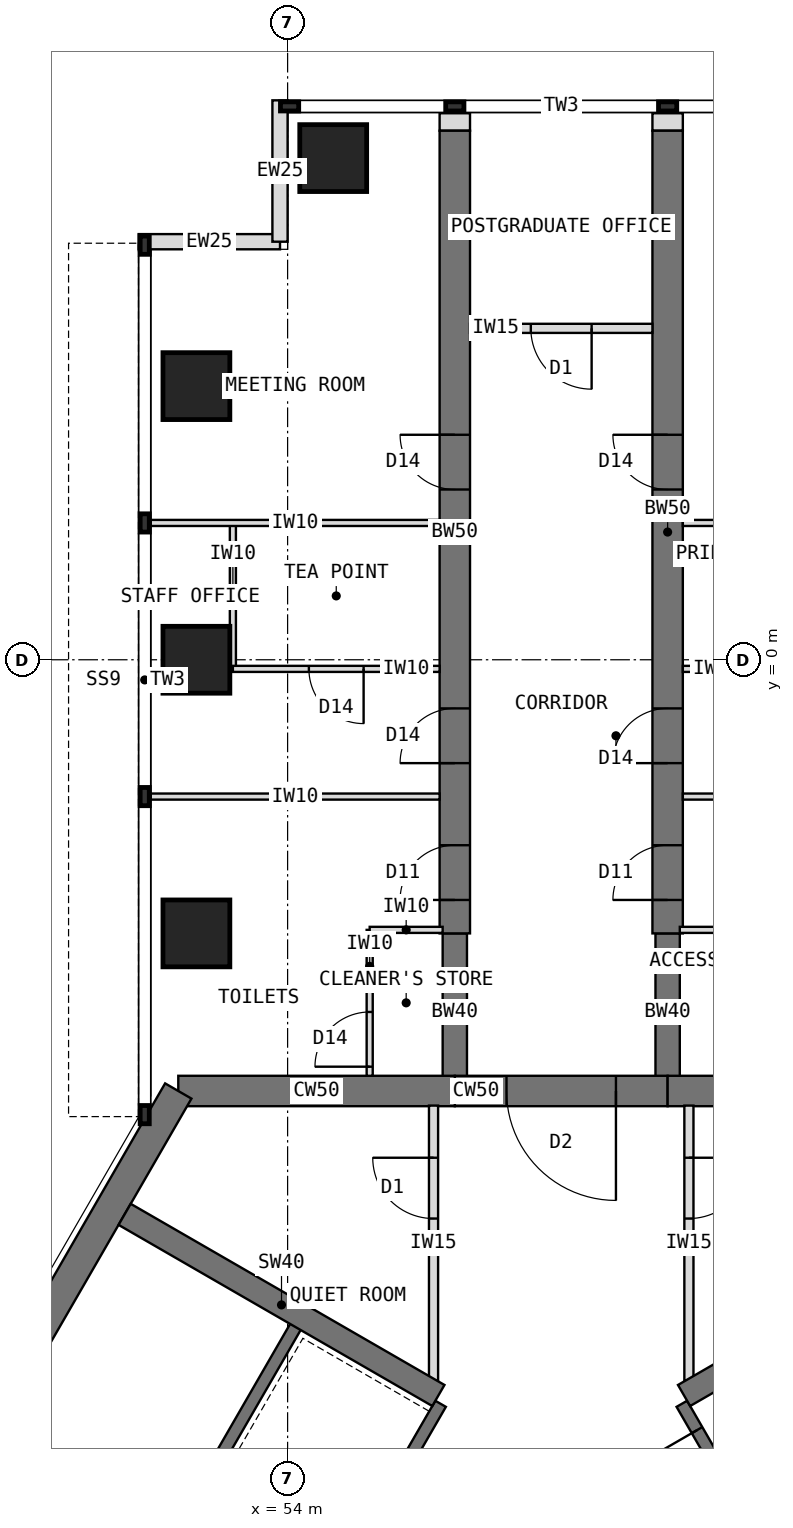
"""IFC4 building model, lengths in metres.
Left out: names, types, materials, properties, quantities, classifications, styles, units other than length and angle.
Written with IfcOpenShell. Run it as: python <this file> out.ifc"""

import sys

from ifc_helpers import new_model, si_unit, direction, frame, frame_2d, origin, origin_2d, place, context, subcontext, project, spatial, rectangle, extrude, element, fill, save


model = new_model("IFC4")
c1 = context("Model", 3, precision=1e-05, world=origin(), true_north=direction((0.0, 1.0)))
c2 = subcontext(c1, "Body", "Model", "MODEL_VIEW")
j1 = project(units=[si_unit("LENGTHUNIT", "METRE"), si_unit("PLANEANGLEUNIT", "RADIAN")], contexts=[c1])
p1 = place(None, origin())
s1 = spatial("IfcSite", under=j1, at=p1, CompositionType="ELEMENT")
p2 = place(p1, origin())
s2 = spatial("IfcBuilding", under=s1, at=p2, CompositionType="ELEMENT")
p3 = place(p2, frame((0.0, 0.0, 230.5)))
s3 = spatial("IfcBuildingStorey", under=s2, at=p3, CompositionType="ELEMENT", Elevation=230.5)
p4 = place(p3, frame((64.798, -7.092, 0.0), z_axis=(0.0, 0.0, 1.0), x_axis=(-1.0, 0.0, 0.0)))
e1 = element("IfcWall", 1, at=p4, inside=s3, PredefinedType="SHEAR", context=c2, shape_type="SweptSolid", body=[
    extrude(rectangle(XDim=4.548, YDim=0.5, at=frame_2d((2.274, 0.0))), origin(), (0.0, 0.0, 1.0), 4.0),
])
p5 = place(p3, frame((60.25, -7.092, 0.0), z_axis=(0.0, 0.0, 1.0), x_axis=(-1.0, 0.0, 0.0)))
e2 = element("IfcWall", 2, at=p5, inside=s3, PredefinedType="SHEAR", context=c2, shape_type="SweptSolid", body=[
    extrude(rectangle(XDim=3.5, YDim=0.5, at=frame_2d((1.75, 0.0))), origin(), (0.0, 0.0, 1.0), 4.0),
])
p6 = place(p5, frame((0.85, 0.0, 0.0)))
e3 = element("IfcOpeningElement", 3, at=p6, cuts=e2, PredefinedType="OPENING", context=c2, shape_type="SweptSolid", body=[
    extrude(rectangle(XDim=1.8, YDim=2.1, at=frame_2d((0.9, 1.05))), frame((0.0, 0.26, 0.0), z_axis=(0.0, -1.0, 0.0), x_axis=(1.0, 0.0, 0.0)), (0.0, 0.0, 1.0), 0.52),
])
p7 = place(p3, frame((56.75, -7.092, 0.0), z_axis=(0.0, 0.0, 1.0), x_axis=(-1.0, 0.0, 0.0)))
e4 = element("IfcWall", 4, at=p7, inside=s3, PredefinedType="SHEAR", context=c2, shape_type="SweptSolid", body=[
    extrude(rectangle(XDim=4.548, YDim=0.5, at=frame_2d((2.274, 0.0))), origin(), (0.0, 0.0, 1.0), 4.0),
])
p8 = place(p3, frame((52.202, -7.092, 0.0), z_axis=(0.0, 0.0, 1.0), x_axis=(-0.500005998175, -0.866021940709, 0.0)))
e5 = element("IfcWall", 5, at=p8, inside=s3, PredefinedType="SHEAR", context=c2, shape_type="SweptSolid", body=[
    extrude(rectangle(XDim=12.596, YDim=0.5, at=frame_2d((6.298, 0.0))), origin(), (0.0, 0.0, 1.0), 4.0),
])
p9 = place(p3, frame((56.75, -7.092, 0.0), z_axis=(0.0, 0.0, 1.0), x_axis=(0.0, 1.0, 0.0)))
e6 = element("IfcWall", 6, at=p9, inside=s3, PredefinedType="SHEAR", context=c2, shape_type="SweptSolid", body=[
    extrude(rectangle(XDim=2.592, YDim=0.4, at=frame_2d((1.296, 0.0))), origin(), (0.0, 0.0, 1.0), 4.0),
])
p10 = place(p3, frame((56.75, -4.5, 0.0), z_axis=(0.0, 0.0, 1.0), x_axis=(0.0, 1.0, 0.0)))
e7 = element("IfcWall", 7, at=p10, inside=s3, PredefinedType="SHEAR", context=c2, shape_type="SweptSolid", body=[
    extrude(rectangle(XDim=13.2, YDim=0.5, at=frame_2d((6.6, 0.0))), origin(), (0.0, 0.0, 1.0), 4.0),
])
p11 = place(p10, frame((0.55, 0.0, 0.0)))
e8 = element("IfcOpeningElement", 8, at=p11, cuts=e7, PredefinedType="OPENING", context=c2, shape_type="SweptSolid", body=[
    extrude(rectangle(XDim=0.9, YDim=2.1, at=frame_2d((0.45, 1.05))), frame((0.0, 0.26, 0.0), z_axis=(0.0, -1.0, 0.0), x_axis=(1.0, 0.0, 0.0)), (0.0, 0.0, 1.0), 0.52),
])
p12 = place(p10, frame((2.8, 0.0, 0.0)))
e9 = element("IfcOpeningElement", 9, at=p12, cuts=e7, PredefinedType="OPENING", context=c2, shape_type="SweptSolid", body=[
    extrude(rectangle(XDim=0.9, YDim=2.1, at=frame_2d((0.45, 1.05))), frame((0.0, 0.26, 0.0), z_axis=(0.0, -1.0, 0.0), x_axis=(1.0, 0.0, 0.0)), (0.0, 0.0, 1.0), 0.52),
])
p13 = place(p10, frame((7.3, 0.0, 0.0)))
e10 = element("IfcOpeningElement", 10, at=p13, cuts=e7, PredefinedType="OPENING", context=c2, shape_type="SweptSolid", body=[
    extrude(rectangle(XDim=0.9, YDim=2.1, at=frame_2d((0.45, 1.05))), frame((0.0, 0.26, 0.0), z_axis=(0.0, -1.0, 0.0), x_axis=(1.0, 0.0, 0.0)), (0.0, 0.0, 1.0), 0.52),
])
p14 = place(p3, frame((60.25, -7.092, 0.0), z_axis=(0.0, 0.0, 1.0), x_axis=(0.0, 1.0, 0.0)))
e11 = element("IfcWall", 11, at=p14, inside=s3, PredefinedType="SHEAR", context=c2, shape_type="SweptSolid", body=[
    extrude(rectangle(XDim=2.592, YDim=0.4, at=frame_2d((1.296, 0.0))), origin(), (0.0, 0.0, 1.0), 4.0),
])
p15 = place(p3, frame((60.25, -4.5, 0.0), z_axis=(0.0, 0.0, 1.0), x_axis=(0.0, 1.0, 0.0)))
e12 = element("IfcWall", 12, at=p15, inside=s3, PredefinedType="SHEAR", context=c2, shape_type="SweptSolid", body=[
    extrude(rectangle(XDim=13.2, YDim=0.5, at=frame_2d((6.6, 0.0))), origin(), (0.0, 0.0, 1.0), 4.0),
])
p16 = place(p15, frame((0.55, 0.0, 0.0)))
e13 = element("IfcOpeningElement", 13, at=p16, cuts=e12, PredefinedType="OPENING", context=c2, shape_type="SweptSolid", body=[
    extrude(rectangle(XDim=0.9, YDim=2.1, at=frame_2d((0.45, 1.05))), frame((0.0, 0.26, 0.0), z_axis=(0.0, -1.0, 0.0), x_axis=(1.0, 0.0, 0.0)), (0.0, 0.0, 1.0), 0.52),
])
p17 = place(p15, frame((2.8, 0.0, 0.0)))
e14 = element("IfcOpeningElement", 14, at=p17, cuts=e12, PredefinedType="OPENING", context=c2, shape_type="SweptSolid", body=[
    extrude(rectangle(XDim=0.9, YDim=2.1, at=frame_2d((0.45, 1.05))), frame((0.0, 0.26, 0.0), z_axis=(0.0, -1.0, 0.0), x_axis=(1.0, 0.0, 0.0)), (0.0, 0.0, 1.0), 0.52),
])
p18 = place(p15, frame((7.3, 0.0, 0.0)))
e15 = element("IfcOpeningElement", 15, at=p18, cuts=e12, PredefinedType="OPENING", context=c2, shape_type="SweptSolid", body=[
    extrude(rectangle(XDim=0.9, YDim=2.1, at=frame_2d((0.45, 1.05))), frame((0.0, 0.26, 0.0), z_axis=(0.0, -1.0, 0.0), x_axis=(1.0, 0.0, 0.0)), (0.0, 0.0, 1.0), 0.52),
])
for number, where, z_axis, x_axis in (
    (16, (52.5, -4.5, 0.0), (0.0, 0.0, 1.0), (1.0, 0.0, 0.0)),
    (17, (52.5, 0.0, 0.0), (0.0, 0.0, 1.0), (1.0, 0.0, 0.0)),
    (18, (52.5, 4.5, 0.0), (0.0, 0.0, 1.0), (1.0, 0.0, 0.0)),
    (19, (54.75, 8.25, 0.0), (0.0, 0.0, 1.0), (1.0, 0.0, 0.0)),
):
    element("IfcColumn", number, at=place(p3, frame(where, z_axis=z_axis, x_axis=x_axis)), inside=s3, PredefinedType="COLUMN", context=c2, shape_type="SweptSolid", body=[
        extrude(rectangle(XDim=1.1, YDim=1.1, at=origin_2d()), origin(), (0.0, 0.0, 1.0), 4.0),
    ])
for number, where, z_axis, x_axis in (
    (20, (51.55, 6.875, 0.0), (0.0, 0.0, 1.0), (1.0, 0.0, 0.0)),
    (21, (53.875, 6.875, 0.0), (0.0, 0.0, 1.0), (0.0, 1.0, 0.0)),
):
    element("IfcWall", number, at=place(p3, frame(where, z_axis=z_axis, x_axis=x_axis)), inside=s3, PredefinedType="STANDARD", context=c2, shape_type="SweptSolid", body=[
        extrude(rectangle(XDim=2.325, YDim=0.25, at=frame_2d((1.163, 0.0))), origin(), (0.0, 0.0, 1.0), 3.8),
    ])
for number, where, z_axis, x_axis in (
    (22, (56.75, 8.7, 0.0), (0.0, 0.0, 1.0), (0.0, 1.0, 0.0)),
    (23, (60.25, 8.7, 0.0), (0.0, 0.0, 1.0), (0.0, 1.0, 0.0)),
):
    element("IfcWall", number, at=place(p3, frame(where, z_axis=z_axis, x_axis=x_axis)), inside=s3, PredefinedType="PARTITIONING", context=c2, shape_type="SweptSolid", body=[
        extrude(rectangle(XDim=0.288, YDim=0.5, at=frame_2d((0.144, 0.0))), origin(), (0.0, 0.0, 1.0), 3.8),
    ])
p19 = place(p3, frame((56.516, -12.236, 0.0), z_axis=(0.0, 0.0, 1.0), x_axis=(-0.49999894854, -0.866026010844, 0.0)))
e24 = element("IfcWall", 24, at=p19, inside=s3, PredefinedType="SHEAR", context=c2, shape_type="SweptSolid", body=[
    extrude(rectangle(XDim=8.0, YDim=0.2, at=frame_2d((4.0, 0.0))), origin(), (0.0, 0.0, 1.0), 4.0),
])
p20 = place(p19, frame((6.3, 0.0, 0.0)))
e25 = element("IfcOpeningElement", 25, at=p20, cuts=e24, PredefinedType="OPENING", context=c2, shape_type="SweptSolid", body=[
    extrude(rectangle(XDim=1.2, YDim=2.1, at=frame_2d((0.6, 1.05))), frame((0.0, 0.11, 0.0), z_axis=(0.0, -1.0, 0.0), x_axis=(1.0, 0.0, 0.0)), (0.0, 0.0, 1.0), 0.22),
])
p21 = place(p3, frame((54.178, -10.886, 0.0), z_axis=(0.0, 0.0, 1.0), x_axis=(-0.49999894854, -0.866026010844, 0.0)))
e26 = element("IfcWall", 26, at=p21, inside=s3, PredefinedType="SHEAR", context=c2, shape_type="SweptSolid", body=[
    extrude(rectangle(XDim=8.0, YDim=0.2, at=frame_2d((4.0, 0.0))), origin(), (0.0, 0.0, 1.0), 4.0),
])
p22 = place(p21, frame((6.8, 0.0, 0.0)))
e27 = element("IfcOpeningElement", 27, at=p22, cuts=e26, PredefinedType="OPENING", context=c2, shape_type="SweptSolid", body=[
    extrude(rectangle(XDim=0.9, YDim=2.1, at=frame_2d((0.45, 1.05))), frame((0.0, 0.11, 0.0), z_axis=(0.0, -1.0, 0.0), x_axis=(1.0, 0.0, 0.0)), (0.0, 0.0, 1.0), 0.22),
])
p23 = place(p3, frame((56.48, -12.099, 0.0), z_axis=(0.0, 0.0, 1.0), x_axis=(-0.86602319114, 0.500003832394, 0.0)))
e28 = element("IfcWall", 28, at=p23, inside=s3, PredefinedType="SHEAR", context=c2, shape_type="SweptSolid", body=[
    extrude(rectangle(XDim=5.958, YDim=0.4, at=frame_2d((2.979, 0.0))), origin(), (0.0, 0.0, 1.0), 4.0),
])
p24 = place(p3, frame((64.484, -19.164, 0.0), z_axis=(0.0, 0.0, 1.0), x_axis=(-0.49999894854, 0.866026010844, 0.0)))
e29 = element("IfcWall", 29, at=p24, inside=s3, PredefinedType="SHEAR", context=c2, shape_type="SweptSolid", body=[
    extrude(rectangle(XDim=8.0, YDim=0.2, at=frame_2d((4.0, 0.0))), origin(), (0.0, 0.0, 1.0), 4.0),
])
p25 = place(p24, frame((6.3, 0.0, 0.0)))
e30 = element("IfcOpeningElement", 30, at=p25, cuts=e29, PredefinedType="OPENING", context=c2, shape_type="SweptSolid", body=[
    extrude(rectangle(XDim=1.2, YDim=2.1, at=frame_2d((0.6, 1.05))), frame((0.0, 0.11, 0.0), z_axis=(0.0, -1.0, 0.0), x_axis=(1.0, 0.0, 0.0)), (0.0, 0.0, 1.0), 0.22),
])
p26 = place(p24, frame((0.9, 0.0, 0.0)))
e31 = element("IfcOpeningElement", 31, at=p26, cuts=e29, PredefinedType="OPENING", context=c2, shape_type="SweptSolid", body=[
    extrude(rectangle(XDim=1.1, YDim=2.2, at=frame_2d((0.55, 1.1))), frame((0.0, 0.11, 0.0), z_axis=(0.0, -1.0, 0.0), x_axis=(1.0, 0.0, 0.0)), (0.0, 0.0, 1.0), 0.22),
])
p27 = place(p24, frame((3.8, 0.0, 0.0)))
e32 = element("IfcOpeningElement", 32, at=p27, cuts=e29, PredefinedType="OPENING", context=c2, shape_type="SweptSolid", body=[
    extrude(rectangle(XDim=1.1, YDim=2.2, at=frame_2d((0.55, 1.1))), frame((0.0, 0.11, 0.0), z_axis=(0.0, -1.0, 0.0), x_axis=(1.0, 0.0, 0.0)), (0.0, 0.0, 1.0), 0.22),
])
p28 = place(p3, frame((60.52, -12.099, 0.0), z_axis=(0.0, 0.0, 1.0), x_axis=(0.86602319114, 0.500003832394, 0.0)))
e33 = element("IfcWall", 33, at=p28, inside=s3, PredefinedType="SHEAR", context=c2, shape_type="SweptSolid", body=[
    extrude(rectangle(XDim=5.958, YDim=0.4, at=frame_2d((2.979, 0.0))), origin(), (0.0, 0.0, 1.0), 4.0),
])
for number, where, z_axis, x_axis in (
    (34, (56.5, -2.25, 0.0), (0.0, 0.0, 1.0), (-1.0, 0.0, 0.0)),
    (35, (56.5, 2.25, 0.0), (0.0, 0.0, 1.0), (-1.0, 0.0, 0.0)),
):
    element("IfcWall", number, at=place(p3, frame(where, z_axis=z_axis, x_axis=x_axis)), inside=s3, PredefinedType="PARTITIONING", context=c2, shape_type="SweptSolid", body=[
        extrude(rectangle(XDim=4.75, YDim=0.1, at=frame_2d((2.375, 0.0))), origin(), (0.0, 0.0, 1.0), 3.8),
    ])
p29 = place(p3, frame((53.1, -0.15, 0.0), z_axis=(0.0, 0.0, 1.0), x_axis=(0.0, 1.0, 0.0)))
e36 = element("IfcWall", 36, at=p29, inside=s3, PredefinedType="PARTITIONING", context=c2, shape_type="SweptSolid", body=[
    extrude(rectangle(XDim=2.4, YDim=0.1, at=frame_2d((1.2, 0.0))), origin(), (0.0, 0.0, 1.0), 3.8),
])
p30 = place(p3, frame((56.5, -0.15, 0.0), z_axis=(0.0, 0.0, 1.0), x_axis=(-1.0, 0.0, 0.0)))
e37 = element("IfcWall", 37, at=p30, inside=s3, PredefinedType="PARTITIONING", context=c2, shape_type="SweptSolid", body=[
    extrude(rectangle(XDim=3.4, YDim=0.1, at=frame_2d((1.7, 0.0))), origin(), (0.0, 0.0, 1.0), 3.8),
])
p31 = place(p30, frame((1.25, 0.0, 0.0)))
e38 = element("IfcOpeningElement", 38, at=p31, cuts=e37, PredefinedType="OPENING", context=c2, shape_type="SweptSolid", body=[
    extrude(rectangle(XDim=0.9, YDim=2.1, at=frame_2d((0.45, 1.05))), frame((0.0, 0.06, 0.0), z_axis=(0.0, -1.0, 0.0), x_axis=(1.0, 0.0, 0.0)), (0.0, 0.0, 1.0), 0.12),
])
p32 = place(p3, frame((55.35, -6.842, 0.0), z_axis=(0.0, 0.0, 1.0), x_axis=(0.0, 1.0, 0.0)))
e39 = element("IfcWall", 39, at=p32, inside=s3, PredefinedType="PARTITIONING", context=c2, shape_type="SweptSolid", body=[
    extrude(rectangle(XDim=2.4, YDim=0.1, at=frame_2d((1.2, 0.0))), origin(), (0.0, 0.0, 1.0), 3.8),
])
p33 = place(p32, frame((0.15, 0.0, 0.0)))
e40 = element("IfcOpeningElement", 40, at=p33, cuts=e39, PredefinedType="OPENING", context=c2, shape_type="SweptSolid", body=[
    extrude(rectangle(XDim=0.9, YDim=2.1, at=frame_2d((0.45, 1.05))), frame((0.0, 0.06, 0.0), z_axis=(0.0, -1.0, 0.0), x_axis=(1.0, 0.0, 0.0)), (0.0, 0.0, 1.0), 0.12),
])
p34 = place(p3, frame((56.55, -4.442, 0.0), z_axis=(0.0, 0.0, 1.0), x_axis=(-1.0, 0.0, 0.0)))
e41 = element("IfcWall", 41, at=p34, inside=s3, PredefinedType="PARTITIONING", context=c2, shape_type="SweptSolid", body=[
    extrude(rectangle(XDim=1.2, YDim=0.1, at=frame_2d((0.6, 0.0))), origin(), (0.0, 0.0, 1.0), 3.267),
])
for number, where, z_axis, x_axis in (
    (42, (60.5, -2.25, 0.0), (0.0, 0.0, 1.0), (1.0, 0.0, 0.0)),
    (43, (60.5, 2.25, 0.0), (0.0, 0.0, 1.0), (1.0, 0.0, 0.0)),
):
    element("IfcWall", number, at=place(p3, frame(where, z_axis=z_axis, x_axis=x_axis)), inside=s3, PredefinedType="PARTITIONING", context=c2, shape_type="SweptSolid", body=[
        extrude(rectangle(XDim=4.75, YDim=0.1, at=frame_2d((2.375, 0.0))), origin(), (0.0, 0.0, 1.0), 3.8),
    ])
p35 = place(p3, frame((60.5, -0.15, 0.0), z_axis=(0.0, 0.0, 1.0), x_axis=(1.0, 0.0, 0.0)))
e44 = element("IfcWall", 44, at=p35, inside=s3, PredefinedType="PARTITIONING", context=c2, shape_type="SweptSolid", body=[
    extrude(rectangle(XDim=3.4, YDim=0.1, at=frame_2d((1.7, 0.0))), origin(), (0.0, 0.0, 1.0), 3.8),
])
p36 = place(p35, frame((1.25, 0.0, 0.0)))
e45 = element("IfcOpeningElement", 45, at=p36, cuts=e44, PredefinedType="OPENING", context=c2, shape_type="SweptSolid", body=[
    extrude(rectangle(XDim=0.9, YDim=2.1, at=frame_2d((0.45, 1.05))), frame((0.0, 0.06, 0.0), z_axis=(0.0, -1.0, 0.0), x_axis=(1.0, 0.0, 0.0)), (0.0, 0.0, 1.0), 0.12),
])
p37 = place(p3, frame((60.45, -4.442, 0.0), z_axis=(0.0, 0.0, 1.0), x_axis=(1.0, 0.0, 0.0)))
e46 = element("IfcWall", 46, at=p37, inside=s3, PredefinedType="PARTITIONING", context=c2, shape_type="SweptSolid", body=[
    extrude(rectangle(XDim=3.2, YDim=0.1, at=frame_2d((1.6, 0.0))), origin(), (0.0, 0.0, 1.0), 3.267),
])
p38 = place(p3, frame((56.4, -11.857, 0.0), z_axis=(0.0, 0.0, 1.0), x_axis=(0.0, 1.0, 0.0)))
e47 = element("IfcWall", 47, at=p38, inside=s3, PredefinedType="PARTITIONING", context=c2, shape_type="SweptSolid", body=[
    extrude(rectangle(XDim=4.526, YDim=0.15, at=frame_2d((2.263, 0.0))), origin(), (0.0, 0.0, 1.0), 3.8),
])
p39 = place(p38, frame((2.668, 0.0, 0.0)))
e48 = element("IfcOpeningElement", 48, at=p39, cuts=e47, PredefinedType="OPENING", context=c2, shape_type="SweptSolid", body=[
    extrude(rectangle(XDim=1.0, YDim=2.1, at=frame_2d((0.5, 1.05))), frame((0.0, 0.085, 0.0), z_axis=(0.0, -1.0, 0.0), x_axis=(1.0, 0.0, 0.0)), (0.0, 0.0, 1.0), 0.17),
])
p40 = place(p3, frame((60.6, -7.332, 0.0), z_axis=(0.0, 0.0, 1.0), x_axis=(0.0, -1.0, 0.0)))
e49 = element("IfcWall", 49, at=p40, inside=s3, PredefinedType="PARTITIONING", context=c2, shape_type="SweptSolid", body=[
    extrude(rectangle(XDim=4.526, YDim=0.15, at=frame_2d((2.263, 0.0))), origin(), (0.0, 0.0, 1.0), 3.8),
])
p41 = place(p40, frame((0.858, 0.0, 0.0)))
e50 = element("IfcOpeningElement", 50, at=p41, cuts=e49, PredefinedType="OPENING", context=c2, shape_type="SweptSolid", body=[
    extrude(rectangle(XDim=1.0, YDim=2.1, at=frame_2d((0.5, 1.05))), frame((0.0, 0.085, 0.0), z_axis=(0.0, -1.0, 0.0), x_axis=(1.0, 0.0, 0.0)), (0.0, 0.0, 1.0), 0.17),
])
p42 = place(p3, frame((60.0, 5.45, 0.0), z_axis=(0.0, 0.0, 1.0), x_axis=(-1.0, 0.0, 0.0)))
e51 = element("IfcWall", 51, at=p42, inside=s3, PredefinedType="PARTITIONING", context=c2, shape_type="SweptSolid", body=[
    extrude(rectangle(XDim=3.0, YDim=0.15, at=frame_2d((1.5, 0.0))), origin(), (0.0, 0.0, 1.0), 3.8),
])
p43 = place(p42, frame((1.0, 0.0, 0.0)))
e52 = element("IfcOpeningElement", 52, at=p43, cuts=e51, PredefinedType="OPENING", context=c2, shape_type="SweptSolid", body=[
    extrude(rectangle(XDim=1.0, YDim=2.1, at=frame_2d((0.5, 1.05))), frame((0.0, 0.085, 0.0), z_axis=(0.0, -1.0, 0.0), x_axis=(1.0, 0.0, 0.0)), (0.0, 0.0, 1.0), 0.17),
])
p44 = place(p25, origin())
e53 = element("IfcDoor", 53, at=p44, inside=s3, OperationType="SINGLE_SWING_RIGHT", PredefinedType="DOOR", context=c2, shape_type="SweptSolid", body=[
    extrude(rectangle(XDim=1.2, YDim=2.1, at=frame_2d((0.6, 1.05))), frame((0.0, 0.025, 0.0), z_axis=(0.0, -1.0, 0.0), x_axis=(1.0, 0.0, 0.0)), (0.0, 0.0, 1.0), 0.05),
])
fill(e30, e53)
p45 = place(p6, origin())
e54 = element("IfcDoor", 54, at=p45, inside=s3, OperationType="DOUBLE_DOOR_DOUBLE_SWING", PredefinedType="DOOR", context=c2, shape_type="SweptSolid", body=[
    extrude(rectangle(XDim=1.8, YDim=2.1, at=frame_2d((0.9, 1.05))), frame((0.0, 0.025, 0.0), z_axis=(0.0, -1.0, 0.0), x_axis=(1.0, 0.0, 0.0)), (0.0, 0.0, 1.0), 0.05),
])
fill(e3, e54)
p46 = place(p31, origin())
e55 = element("IfcDoor", 55, at=p46, inside=s3, OperationType="SINGLE_SWING_LEFT", PredefinedType="DOOR", context=c2, shape_type="SweptSolid", body=[
    extrude(rectangle(XDim=0.9, YDim=2.1, at=frame_2d((0.45, 1.05))), frame((0.0, 0.025, 0.0), z_axis=(0.0, -1.0, 0.0), x_axis=(1.0, 0.0, 0.0)), (0.0, 0.0, 1.0), 0.05),
])
fill(e38, e55)
p47 = place(p33, origin())
e56 = element("IfcDoor", 56, at=p47, inside=s3, OperationType="SINGLE_SWING_LEFT", PredefinedType="DOOR", context=c2, shape_type="SweptSolid", body=[
    extrude(rectangle(XDim=0.9, YDim=2.1, at=frame_2d((0.45, 1.05))), frame((0.0, 0.025, 0.0), z_axis=(0.0, -1.0, 0.0), x_axis=(1.0, 0.0, 0.0)), (0.0, 0.0, 1.0), 0.05),
])
fill(e40, e56)
p48 = place(p41, origin())
e57 = element("IfcDoor", 57, at=p48, inside=s3, OperationType="SINGLE_SWING_LEFT", PredefinedType="DOOR", context=c2, shape_type="SweptSolid", body=[
    extrude(rectangle(XDim=1.0, YDim=2.1, at=frame_2d((0.5, 1.05))), frame((0.0, 0.025, 0.0), z_axis=(0.0, -1.0, 0.0), x_axis=(1.0, 0.0, 0.0)), (0.0, 0.0, 1.0), 0.05),
])
fill(e50, e57)
p49 = place(p39, origin())
e58 = element("IfcDoor", 58, at=p49, inside=s3, OperationType="SINGLE_SWING_RIGHT", PredefinedType="DOOR", context=c2, shape_type="SweptSolid", body=[
    extrude(rectangle(XDim=1.0, YDim=2.1, at=frame_2d((0.5, 1.05))), frame((0.0, 0.025, 0.0), z_axis=(0.0, -1.0, 0.0), x_axis=(1.0, 0.0, 0.0)), (0.0, 0.0, 1.0), 0.05),
])
fill(e48, e58)
p50 = place(p43, origin())
e59 = element("IfcDoor", 59, at=p50, inside=s3, OperationType="SINGLE_SWING_LEFT", PredefinedType="DOOR", context=c2, shape_type="SweptSolid", body=[
    extrude(rectangle(XDim=1.0, YDim=2.1, at=frame_2d((0.5, 1.05))), frame((0.0, 0.025, 0.0), z_axis=(0.0, -1.0, 0.0), x_axis=(1.0, 0.0, 0.0)), (0.0, 0.0, 1.0), 0.05),
])
fill(e52, e59)
p51 = place(p11, origin())
e60 = element("IfcDoor", 60, at=p51, inside=s3, OperationType="SINGLE_SWING_LEFT", PredefinedType="DOOR", context=c2, shape_type="SweptSolid", body=[
    extrude(rectangle(XDim=0.9, YDim=2.1, at=frame_2d((0.45, 1.05))), frame((0.0, 0.025, 0.0), z_axis=(0.0, -1.0, 0.0), x_axis=(1.0, 0.0, 0.0)), (0.0, 0.0, 1.0), 0.05),
])
fill(e8, e60)
p52 = place(p12, origin())
e61 = element("IfcDoor", 61, at=p52, inside=s3, OperationType="SINGLE_SWING_LEFT", PredefinedType="DOOR", context=c2, shape_type="SweptSolid", body=[
    extrude(rectangle(XDim=0.9, YDim=2.1, at=frame_2d((0.45, 1.05))), frame((0.0, 0.025, 0.0), z_axis=(0.0, -1.0, 0.0), x_axis=(1.0, 0.0, 0.0)), (0.0, 0.0, 1.0), 0.05),
])
fill(e9, e61)
p53 = place(p13, origin())
e62 = element("IfcDoor", 62, at=p53, inside=s3, OperationType="SINGLE_SWING_RIGHT", PredefinedType="DOOR", context=c2, shape_type="SweptSolid", body=[
    extrude(rectangle(XDim=0.9, YDim=2.1, at=frame_2d((0.45, 1.05))), frame((0.0, 0.025, 0.0), z_axis=(0.0, -1.0, 0.0), x_axis=(1.0, 0.0, 0.0)), (0.0, 0.0, 1.0), 0.05),
])
fill(e10, e62)
p54 = place(p16, origin())
e63 = element("IfcDoor", 63, at=p54, inside=s3, OperationType="SINGLE_SWING_LEFT", PredefinedType="DOOR", context=c2, shape_type="SweptSolid", body=[
    extrude(rectangle(XDim=0.9, YDim=2.1, at=frame_2d((0.45, 1.05))), frame((0.0, 0.025, 0.0), z_axis=(0.0, -1.0, 0.0), x_axis=(1.0, 0.0, 0.0)), (0.0, 0.0, 1.0), 0.05),
])
fill(e13, e63)
p55 = place(p17, origin())
e64 = element("IfcDoor", 64, at=p55, inside=s3, OperationType="SINGLE_SWING_LEFT", PredefinedType="DOOR", context=c2, shape_type="SweptSolid", body=[
    extrude(rectangle(XDim=0.9, YDim=2.1, at=frame_2d((0.45, 1.05))), frame((0.0, 0.025, 0.0), z_axis=(0.0, -1.0, 0.0), x_axis=(1.0, 0.0, 0.0)), (0.0, 0.0, 1.0), 0.05),
])
fill(e14, e64)
p56 = place(p18, origin())
e65 = element("IfcDoor", 65, at=p56, inside=s3, OperationType="SINGLE_SWING_RIGHT", PredefinedType="DOOR", context=c2, shape_type="SweptSolid", body=[
    extrude(rectangle(XDim=0.9, YDim=2.1, at=frame_2d((0.45, 1.05))), frame((0.0, 0.025, 0.0), z_axis=(0.0, -1.0, 0.0), x_axis=(1.0, 0.0, 0.0)), (0.0, 0.0, 1.0), 0.05),
])
fill(e15, e65)
save(model, sys.argv[1])
